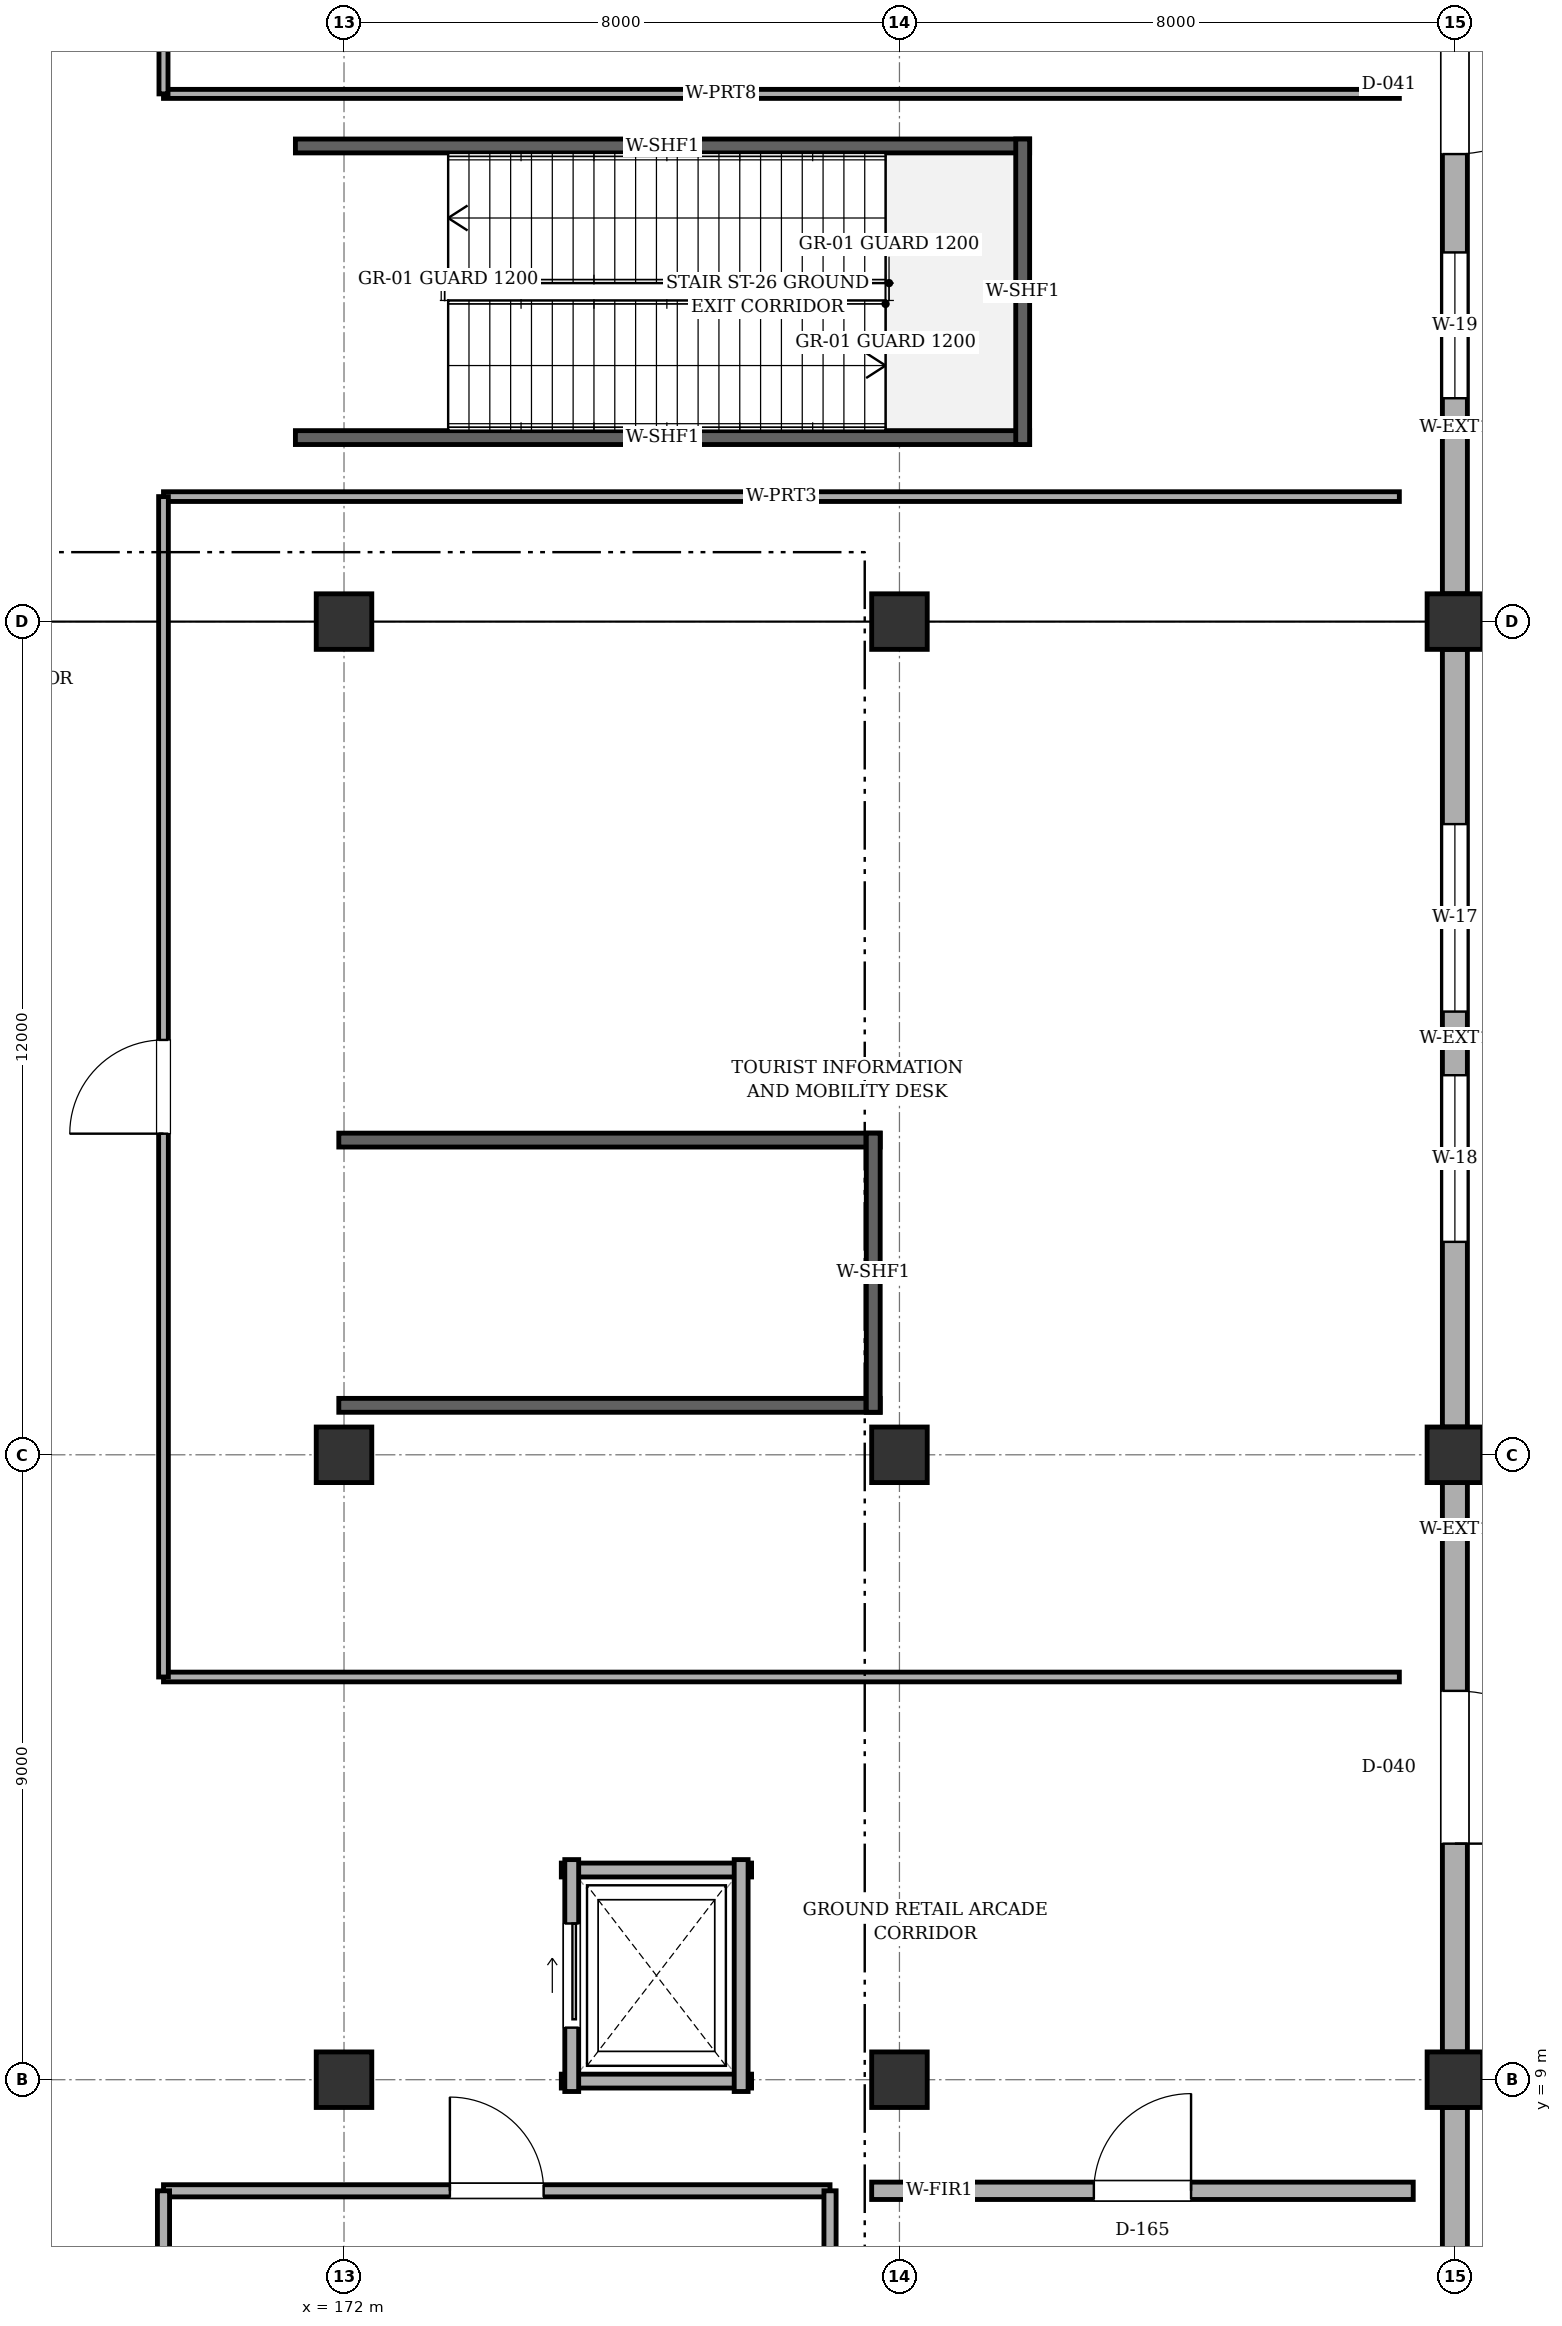
"""IFC4 building model, lengths in metres.
Left out: names, types, materials, properties, quantities, classifications, styles, units other than length and angle.
Written with IfcOpenShell. Run it as: python <this file> out.ifc"""

import sys

from ifc_helpers import new_model, si_unit, direction, frame, frame_2d, origin, origin_2d, place, context, subcontext, project, spatial, rectangle, extrude, element, fill, save


model = new_model("IFC4")
c1 = context("Model", 3, precision=1e-05, world=origin(), true_north=direction((0.0, 1.0)))
c2 = subcontext(c1, "Body", "Model", "MODEL_VIEW")
j1 = project(units=[si_unit("LENGTHUNIT", "METRE"), si_unit("PLANEANGLEUNIT", "RADIAN")], contexts=[c1])
p1 = place(None, origin())
s1 = spatial("IfcSite", under=j1, at=p1, CompositionType="ELEMENT")
p2 = place(p1, origin())
s2 = spatial("IfcBuilding", under=s1, at=p2, CompositionType="ELEMENT")
p3 = place(p2, origin())
s3 = spatial("IfcBuildingStorey", under=s2, at=p3, CompositionType="ELEMENT", Elevation=0.0)
for number, where, z_axis, x_axis in (
    (1, (172.0, 9.0, 0.0), (0.0, 0.0, 1.0), (1.0, 0.0, 0.0)),
    (2, (172.0, 18.0, 0.0), (0.0, 0.0, 1.0), (1.0, 0.0, 0.0)),
    (3, (172.0, 30.0, 0.0), (0.0, 0.0, 1.0), (1.0, 0.0, 0.0)),
    (4, (180.0, 9.0, 0.0), (0.0, 0.0, 1.0), (1.0, 0.0, 0.0)),
    (5, (180.0, 18.0, 0.0), (0.0, 0.0, 1.0), (1.0, 0.0, 0.0)),
    (6, (180.0, 30.0, 0.0), (0.0, 0.0, 1.0), (1.0, 0.0, 0.0)),
    (7, (188.0, 9.0, 0.0), (0.0, 0.0, 1.0), (1.0, 0.0, 0.0)),
    (8, (188.0, 18.0, 0.0), (0.0, 0.0, 1.0), (1.0, 0.0, 0.0)),
    (9, (188.0, 30.0, 0.0), (0.0, 0.0, 1.0), (1.0, 0.0, 0.0)),
):
    element("IfcColumn", number, at=place(p3, frame(where, z_axis=z_axis, x_axis=x_axis)), inside=s3, PredefinedType="COLUMN", context=c2, shape_type="SweptSolid", body=[
        extrude(rectangle(XDim=0.8, YDim=0.8, at=origin_2d()), origin(), (0.0, 0.0, 1.0), 6.6),
    ])
p4 = place(p3, frame((188.0, 8.6, 0.0), z_axis=(0.0, 0.0, 1.0), x_axis=(0.0, -1.0, 0.0)))
e10 = element("IfcWall", 10, at=p4, inside=s3, PredefinedType="SOLIDWALL", context=c2, shape_type="SweptSolid", body=[
    extrude(rectangle(XDim=8.2, YDim=0.36, at=frame_2d((4.1, 0.0))), origin(), (0.0, 0.0, 1.0), 5.875),
])
p5 = place(p4, frame((3.4, 0.0, 0.0)))
e11 = element("IfcOpeningElement", 11, at=p5, cuts=e10, PredefinedType="OPENING", context=c2, shape_type="SweptSolid", body=[
    extrude(rectangle(XDim=1.4, YDim=2.1, at=frame_2d((0.7, 1.05))), frame((0.0, 0.19, 0.0), z_axis=(0.0, -1.0, 0.0), x_axis=(1.0, 0.0, 0.0)), (0.0, 0.0, 1.0), 0.38),
])
p6 = place(p3, frame((188.0, 17.6, 0.0), z_axis=(0.0, 0.0, 1.0), x_axis=(0.0, -1.0, 0.0)))
e12 = element("IfcWall", 12, at=p6, inside=s3, PredefinedType="SOLIDWALL", context=c2, shape_type="SweptSolid", body=[
    extrude(rectangle(XDim=8.2, YDim=0.36, at=frame_2d((4.1, 0.0))), origin(), (0.0, 0.0, 1.0), 5.755),
])
p7 = place(p6, frame((3.0, 0.0, 0.0)))
e13 = element("IfcOpeningElement", 13, at=p7, cuts=e12, PredefinedType="OPENING", context=c2, shape_type="SweptSolid", body=[
    extrude(rectangle(XDim=2.2, YDim=2.45, at=frame_2d((1.1, 1.225))), frame((0.0, 0.19, 0.0), z_axis=(0.0, -1.0, 0.0), x_axis=(1.0, 0.0, 0.0)), (0.0, 0.0, 1.0), 0.38),
])
p8 = place(p3, frame((188.0, 29.6, 0.0), z_axis=(0.0, 0.0, 1.0), x_axis=(0.0, -1.0, 0.0)))
e14 = element("IfcWall", 14, at=p8, inside=s3, PredefinedType="SOLIDWALL", context=c2, shape_type="SweptSolid", body=[
    extrude(rectangle(XDim=11.2, YDim=0.36, at=frame_2d((5.6, 0.0))), origin(), (0.0, 0.0, 1.0), 5.755),
])
p9 = place(p8, frame((2.517, 0.0, 0.95)))
e15 = element("IfcOpeningElement", 15, at=p9, cuts=e14, PredefinedType="OPENING", context=c2, shape_type="SweptSolid", body=[
    extrude(rectangle(XDim=2.7, YDim=2.1, at=frame_2d((1.35, 1.05))), frame((0.0, 0.19, 0.0), z_axis=(0.0, -1.0, 0.0), x_axis=(1.0, 0.0, 0.0)), (0.0, 0.0, 1.0), 0.38),
])
p10 = place(p8, frame((6.133, 0.0, 0.95)))
e16 = element("IfcOpeningElement", 16, at=p10, cuts=e14, PredefinedType="OPENING", context=c2, shape_type="SweptSolid", body=[
    extrude(rectangle(XDim=2.4, YDim=2.1, at=frame_2d((1.2, 1.05))), frame((0.0, 0.19, 0.0), z_axis=(0.0, -1.0, 0.0), x_axis=(1.0, 0.0, 0.0)), (0.0, 0.0, 1.0), 0.38),
])
p11 = place(p3, frame((188.0, 41.6, 0.0), z_axis=(0.0, 0.0, 1.0), x_axis=(0.0, -1.0, 0.0)))
e17 = element("IfcWall", 17, at=p11, inside=s3, PredefinedType="SOLIDWALL", context=c2, shape_type="SweptSolid", body=[
    extrude(rectangle(XDim=11.2, YDim=0.36, at=frame_2d((5.6, 0.0))), origin(), (0.0, 0.0, 1.0), 5.755),
])
p12 = place(p11, frame((2.867, 0.0, 0.0)))
e18 = element("IfcOpeningElement", 18, at=p12, cuts=e17, PredefinedType="OPENING", context=c2, shape_type="SweptSolid", body=[
    extrude(rectangle(XDim=2.0, YDim=2.4, at=frame_2d((1.0, 1.2))), frame((0.0, 0.19, 0.0), z_axis=(0.0, -1.0, 0.0), x_axis=(1.0, 0.0, 0.0)), (0.0, 0.0, 1.0), 0.38),
])
p13 = place(p11, frame((6.283, 0.0, 0.95)))
e19 = element("IfcOpeningElement", 19, at=p13, cuts=e17, PredefinedType="OPENING", context=c2, shape_type="SweptSolid", body=[
    extrude(rectangle(XDim=2.1, YDim=2.0, at=frame_2d((1.05, 1.0))), frame((0.0, 0.19, 0.0), z_axis=(0.0, -1.0, 0.0), x_axis=(1.0, 0.0, 0.0)), (0.0, 0.0, 1.0), 0.38),
])
for number, where, z_axis, x_axis in (
    (20, (171.3, 32.65, 0.0), (0.0, 0.0, 1.0), (1.0, 0.0, 0.0)),
    (21, (181.875, 36.85, 0.0), (0.0, 0.0, 1.0), (-1.0, 0.0, 0.0)),
):
    element("IfcWall", number, at=place(p3, frame(where, z_axis=z_axis, x_axis=x_axis)), inside=s3, PredefinedType="SOLIDWALL", context=c2, shape_type="SweptSolid", body=[
        extrude(rectangle(XDim=10.575, YDim=0.2, at=frame_2d((5.288, 0.0))), origin(), (0.0, 0.0, 1.0), 6.36),
    ])
p14 = place(p3, frame((181.775, 32.55, 0.0), z_axis=(0.0, 0.0, 1.0), x_axis=(0.0, 1.0, 0.0)))
e22 = element("IfcWall", 22, at=p14, inside=s3, PredefinedType="SOLIDWALL", context=c2, shape_type="SweptSolid", body=[
    extrude(rectangle(XDim=4.4, YDim=0.2, at=frame_2d((2.2, 0.0))), origin(), (0.0, 0.0, 1.0), 6.36),
])
for number, where, z_axis, x_axis in (
    (23, (171.925, 18.712, 0.0), (0.0, 0.0, 1.0), (1.0, 0.0, 0.0)),
    (24, (179.722, 22.532, 0.0), (0.0, 0.0, 1.0), (-1.0, 0.0, 0.0)),
):
    element("IfcWall", number, at=place(p3, frame(where, z_axis=z_axis, x_axis=x_axis)), inside=s3, PredefinedType="SOLIDWALL", context=c2, shape_type="SweptSolid", body=[
        extrude(rectangle(XDim=7.797, YDim=0.2, at=frame_2d((3.899, 0.0))), origin(), (0.0, 0.0, 1.0), 6.36),
    ])
p15 = place(p3, frame((179.623, 18.613, 0.0), z_axis=(0.0, 0.0, 1.0), x_axis=(0.0, 1.0, 0.0)))
e25 = element("IfcWall", 25, at=p15, inside=s3, PredefinedType="SOLIDWALL", context=c2, shape_type="SweptSolid", body=[
    extrude(rectangle(XDim=4.02, YDim=0.2, at=frame_2d((2.01, 0.0))), origin(), (0.0, 0.0, 1.0), 6.36),
])
for number, where, z_axis, x_axis in (
    (26, (175.13, 8.98, 0.0), (0.0, 0.0, 1.0), (1.0, 0.0, 0.0)),
    (27, (177.87, 12.02, 0.0), (0.0, 0.0, 1.0), (-1.0, 0.0, 0.0)),
):
    element("IfcWall", number, at=place(p3, frame(where, z_axis=z_axis, x_axis=x_axis)), inside=s3, PredefinedType="SOLIDWALL", context=c2, shape_type="SweptSolid", body=[
        extrude(rectangle(XDim=2.74, YDim=0.2, at=frame_2d((1.37, 0.0))), origin(), (0.0, 0.0, 1.0), 4.4),
    ])
p16 = place(p3, frame((175.28, 12.17, 0.0), z_axis=(0.0, 0.0, 1.0), x_axis=(0.0, -1.0, 0.0)))
e28 = element("IfcWall", 28, at=p16, inside=s3, PredefinedType="SOLIDWALL", context=c2, shape_type="SweptSolid", body=[
    extrude(rectangle(XDim=3.34, YDim=0.2, at=frame_2d((1.67, 0.0))), origin(), (0.0, 0.0, 1.0), 4.4),
])
p17 = place(p16, frame((0.92, 0.0, 0.0)))
e29 = element("IfcOpeningElement", 29, at=p17, cuts=e28, PredefinedType="OPENING", context=c2, shape_type="SweptSolid", body=[
    extrude(rectangle(XDim=1.5, YDim=2.2, at=frame_2d((0.75, 1.1))), frame((0.0, 0.11, 0.0), z_axis=(0.0, -1.0, 0.0), x_axis=(1.0, 0.0, 0.0)), (0.0, 0.0, 1.0), 0.22),
])
p18 = place(p3, frame((177.72, 8.83, 0.0), z_axis=(0.0, 0.0, 1.0), x_axis=(0.0, 1.0, 0.0)))
e30 = element("IfcWall", 30, at=p18, inside=s3, PredefinedType="SOLIDWALL", context=c2, shape_type="SweptSolid", body=[
    extrude(rectangle(XDim=3.34, YDim=0.2, at=frame_2d((1.67, 0.0))), origin(), (0.0, 0.0, 1.0), 4.4),
])
p19 = place(p3, frame((169.4, 7.4, 0.0), z_axis=(0.0, 0.0, 1.0), x_axis=(1.0, 0.0, 0.0)))
e31 = element("IfcWall", 31, at=p19, inside=s3, PredefinedType="PARTITIONING", context=c2, shape_type="SweptSolid", body=[
    extrude(rectangle(XDim=9.6, YDim=0.175, at=frame_2d((4.8, 0.0))), origin(), (0.0, 0.0, 1.0), 4.4),
])
p20 = place(p19, frame((4.125, 0.0, 0.0)))
e32 = element("IfcOpeningElement", 32, at=p20, cuts=e31, PredefinedType="OPENING", context=c2, shape_type="SweptSolid", body=[
    extrude(rectangle(XDim=1.35, YDim=2.1, at=frame_2d((0.675, 1.05))), frame((0.0, 0.097, 0.0), z_axis=(0.0, -1.0, 0.0), x_axis=(1.0, 0.0, 0.0)), (0.0, 0.0, 1.0), 0.195),
])
for number, where, z_axis, x_axis in (
    (33, (169.4, 0.8, 0.0), (0.0, 0.0, 1.0), (0.0, 1.0, 0.0)),
    (34, (179.0, 7.4, 0.0), (0.0, 0.0, 1.0), (0.0, -1.0, 0.0)),
):
    element("IfcWall", number, at=place(p3, frame(where, z_axis=z_axis, x_axis=x_axis)), inside=s3, PredefinedType="PARTITIONING", context=c2, shape_type="SweptSolid", body=[
        extrude(rectangle(XDim=6.6, YDim=0.175, at=frame_2d((3.3, 0.0))), origin(), (0.0, 0.0, 1.0), 4.4),
    ])
p21 = place(p3, frame((179.6, 7.4, 0.0), z_axis=(0.0, 0.0, 1.0), x_axis=(1.0, 0.0, 0.0)))
e35 = element("IfcWall", 35, at=p21, inside=s3, PredefinedType="SOLIDWALL", context=c2, shape_type="SweptSolid", body=[
    extrude(rectangle(XDim=7.8, YDim=0.25, at=frame_2d((3.9, 0.0))), origin(), (0.0, 0.0, 1.0), 4.4),
])
p22 = place(p21, frame((3.2, 0.0, 0.0)))
e36 = element("IfcOpeningElement", 36, at=p22, cuts=e35, PredefinedType="OPENING", context=c2, shape_type="SweptSolid", body=[
    extrude(rectangle(XDim=1.4, YDim=2.1, at=frame_2d((0.7, 1.05))), frame((0.0, 0.135, 0.0), z_axis=(0.0, -1.0, 0.0), x_axis=(1.0, 0.0, 0.0)), (0.0, 0.0, 1.0), 0.27),
])
for number, where, z_axis, x_axis in (
    (37, (187.2, 14.8, 0.0), (0.0, 0.0, 1.0), (-1.0, 0.0, 0.0)),
    (38, (169.4, 31.8, 0.0), (0.0, 0.0, 1.0), (1.0, 0.0, 0.0)),
):
    element("IfcWall", number, at=place(p3, frame(where, z_axis=z_axis, x_axis=x_axis)), inside=s3, PredefinedType="PARTITIONING", context=c2, shape_type="SweptSolid", body=[
        extrude(rectangle(XDim=17.8, YDim=0.14, at=frame_2d((8.9, 0.0))), origin(), (0.0, 0.0, 1.0), 4.4),
    ])
p23 = place(p3, frame((169.4, 14.8, 0.0), z_axis=(0.0, 0.0, 1.0), x_axis=(0.0, 1.0, 0.0)))
e39 = element("IfcWall", 39, at=p23, inside=s3, PredefinedType="PARTITIONING", context=c2, shape_type="SweptSolid", body=[
    extrude(rectangle(XDim=17.0, YDim=0.14, at=frame_2d((8.5, 0.0))), origin(), (0.0, 0.0, 1.0), 4.4),
])
p24 = place(p23, frame((7.825, 0.0, 0.0)))
e40 = element("IfcOpeningElement", 40, at=p24, cuts=e39, PredefinedType="OPENING", context=c2, shape_type="SweptSolid", body=[
    extrude(rectangle(XDim=1.35, YDim=2.1, at=frame_2d((0.675, 1.05))), frame((0.0, 0.08, 0.0), z_axis=(0.0, -1.0, 0.0), x_axis=(1.0, 0.0, 0.0)), (0.0, 0.0, 1.0), 0.16),
])
p25 = place(p3, frame((187.2, 37.6, 0.0), z_axis=(0.0, 0.0, 1.0), x_axis=(-1.0, 0.0, 0.0)))
e41 = element("IfcWall", 41, at=p25, inside=s3, PredefinedType="PARTITIONING", context=c2, shape_type="SweptSolid", body=[
    extrude(rectangle(XDim=17.8, YDim=0.13, at=frame_2d((8.9, 0.0))), origin(), (0.0, 0.0, 1.0), 4.4),
])
p26 = place(p3, frame((169.4, 37.6, 0.0), z_axis=(0.0, 0.0, 1.0), x_axis=(0.0, 1.0, 0.0)))
e42 = element("IfcWall", 42, at=p26, inside=s3, PredefinedType="PARTITIONING", context=c2, shape_type="SweptSolid", body=[
    extrude(rectangle(XDim=15.8, YDim=0.13, at=frame_2d((7.9, 0.0))), origin(), (0.0, 0.0, 1.0), 4.4),
])
p27 = place(p26, frame((7.125, 0.0, 0.0)))
e43 = element("IfcOpeningElement", 43, at=p27, cuts=e42, PredefinedType="OPENING", context=c2, shape_type="SweptSolid", body=[
    extrude(rectangle(XDim=1.55, YDim=2.1, at=frame_2d((0.775, 1.05))), frame((0.0, 0.075, 0.0), z_axis=(0.0, -1.0, 0.0), x_axis=(1.0, 0.0, 0.0)), (0.0, 0.0, 1.0), 0.15),
])
p28 = place(p26, frame((12.008, 0.0, 0.0)))
e44 = element("IfcOpeningElement", 44, at=p28, cuts=e42, PredefinedType="OPENING", context=c2, shape_type="SweptSolid", body=[
    extrude(rectangle(XDim=1.55, YDim=2.1, at=frame_2d((0.775, 1.05))), frame((0.0, 0.075, 0.0), z_axis=(0.0, -1.0, 0.0), x_axis=(1.0, 0.0, 0.0)), (0.0, 0.0, 1.0), 0.15),
])
p29 = place(p7, origin())
e45 = element("IfcDoor", 45, at=p29, inside=s3, OperationType="SINGLE_SWING_RIGHT", PredefinedType="DOOR", context=c2, shape_type="SweptSolid", body=[
    extrude(rectangle(XDim=2.2, YDim=2.45, at=frame_2d((1.1, 1.225))), frame((0.0, 0.025, 0.0), z_axis=(0.0, -1.0, 0.0), x_axis=(1.0, 0.0, 0.0)), (0.0, 0.0, 1.0), 0.05),
])
fill(e13, e45)
p30 = place(p9, origin())
e46 = element("IfcWindow", 46, at=p30, inside=s3, PartitioningType="SINGLE_PANEL", PredefinedType="WINDOW", context=c2, shape_type="SweptSolid", body=[
    extrude(rectangle(XDim=2.7, YDim=2.1, at=frame_2d((1.35, 1.05))), frame((0.0, 0.03, 0.0), z_axis=(0.0, -1.0, 0.0), x_axis=(1.0, 0.0, 0.0)), (0.0, 0.0, 1.0), 0.06),
])
fill(e15, e46)
p31 = place(p10, origin())
e47 = element("IfcWindow", 47, at=p31, inside=s3, PartitioningType="SINGLE_PANEL", PredefinedType="WINDOW", context=c2, shape_type="SweptSolid", body=[
    extrude(rectangle(XDim=2.4, YDim=2.1, at=frame_2d((1.2, 1.05))), frame((0.0, 0.03, 0.0), z_axis=(0.0, -1.0, 0.0), x_axis=(1.0, 0.0, 0.0)), (0.0, 0.0, 1.0), 0.06),
])
fill(e16, e47)
p32 = place(p12, origin())
e48 = element("IfcDoor", 48, at=p32, inside=s3, OperationType="SINGLE_SWING_LEFT", PredefinedType="DOOR", context=c2, shape_type="SweptSolid", body=[
    extrude(rectangle(XDim=2.0, YDim=2.4, at=frame_2d((1.0, 1.2))), frame((0.0, 0.025, 0.0), z_axis=(0.0, -1.0, 0.0), x_axis=(1.0, 0.0, 0.0)), (0.0, 0.0, 1.0), 0.05),
])
fill(e18, e48)
p33 = place(p13, origin())
e49 = element("IfcWindow", 49, at=p33, inside=s3, PartitioningType="SINGLE_PANEL", PredefinedType="WINDOW", context=c2, shape_type="SweptSolid", body=[
    extrude(rectangle(XDim=2.1, YDim=2.0, at=frame_2d((1.05, 1.0))), frame((0.0, 0.03, 0.0), z_axis=(0.0, -1.0, 0.0), x_axis=(1.0, 0.0, 0.0)), (0.0, 0.0, 1.0), 0.06),
])
fill(e19, e49)
p34 = place(p17, origin())
e50 = element("IfcDoor", 50, at=p34, inside=s3, OperationType="SLIDING_TO_LEFT", PredefinedType="DOOR", context=c2, shape_type="SweptSolid", body=[
    extrude(rectangle(XDim=1.5, YDim=2.2, at=frame_2d((0.75, 1.1))), frame((0.0, 0.025, 0.0), z_axis=(0.0, -1.0, 0.0), x_axis=(1.0, 0.0, 0.0)), (0.0, 0.0, 1.0), 0.05),
])
fill(e29, e50)
p35 = place(p20, origin())
e51 = element("IfcDoor", 51, at=p35, inside=s3, OperationType="SINGLE_SWING_LEFT", PredefinedType="DOOR", context=c2, shape_type="SweptSolid", body=[
    extrude(rectangle(XDim=1.35, YDim=2.1, at=frame_2d((0.675, 1.05))), frame((0.0, 0.025, 0.0), z_axis=(0.0, -1.0, 0.0), x_axis=(1.0, 0.0, 0.0)), (0.0, 0.0, 1.0), 0.05),
])
fill(e32, e51)
p36 = place(p22, origin())
e52 = element("IfcDoor", 52, at=p36, inside=s3, OperationType="SINGLE_SWING_RIGHT", PredefinedType="DOOR", context=c2, shape_type="SweptSolid", body=[
    extrude(rectangle(XDim=1.4, YDim=2.1, at=frame_2d((0.7, 1.05))), frame((0.0, 0.025, 0.0), z_axis=(0.0, -1.0, 0.0), x_axis=(1.0, 0.0, 0.0)), (0.0, 0.0, 1.0), 0.05),
])
fill(e36, e52)
p37 = place(p24, origin())
e53 = element("IfcDoor", 53, at=p37, inside=s3, OperationType="SINGLE_SWING_LEFT", PredefinedType="DOOR", context=c2, shape_type="SweptSolid", body=[
    extrude(rectangle(XDim=1.35, YDim=2.1, at=frame_2d((0.675, 1.05))), frame((0.0, 0.025, 0.0), z_axis=(0.0, -1.0, 0.0), x_axis=(1.0, 0.0, 0.0)), (0.0, 0.0, 1.0), 0.05),
])
fill(e40, e53)
save(model, sys.argv[1])
